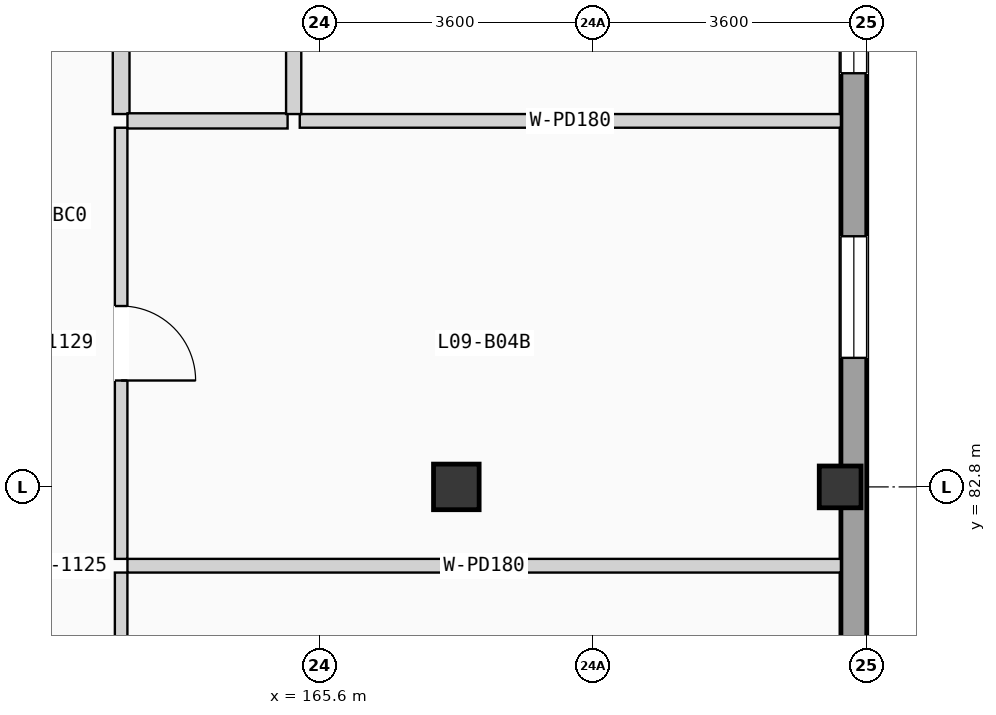
"""IFC4 building model, lengths in metres.
Left out: names, types, materials, properties, quantities, classifications, styles, units other than length and angle.
Written with IfcOpenShell. Run it as: python <this file> out.ifc"""

import sys

from ifc_helpers import new_model, si_unit, direction, frame, frame_2d, origin, origin_2d, place, context, subcontext, project, spatial, rectangle, extrude, element, fill, save


model = new_model("IFC4")
c1 = context("Model", 3, precision=1e-05, world=origin(), true_north=direction((0.0, 1.0)))
c2 = subcontext(c1, "Body", "Model", "MODEL_VIEW")
j1 = project(units=[si_unit("LENGTHUNIT", "METRE"), si_unit("PLANEANGLEUNIT", "RADIAN")], contexts=[c1])
p1 = place(None, origin())
s1 = spatial("IfcSite", under=j1, at=p1, CompositionType="ELEMENT")
p2 = place(p1, origin())
s2 = spatial("IfcBuilding", under=s1, at=p2, CompositionType="ELEMENT")
p3 = place(p2, frame((0.0, 0.0, 30.975)))
s3 = spatial("IfcBuildingStorey", under=s2, at=p3, CompositionType="ELEMENT", Elevation=30.975)
p4 = place(p3, frame((167.4, 82.8, 0.0), z_axis=(0.0, 0.0, 1.0), x_axis=(1.0, 0.0, 0.0)))
e1 = element("IfcColumn", 1, at=p4, inside=s3, PredefinedType="COLUMN", context=c2, shape_type="SweptSolid", body=[
    extrude(rectangle(XDim=0.6, YDim=0.6, at=origin_2d()), origin(), (0.0, 0.0, 1.0), 3.15),
])
p5 = place(p3, frame((172.45, 82.8, 0.0), z_axis=(0.0, 0.0, 1.0), x_axis=(1.0, 0.0, 0.0)))
e2 = element("IfcColumn", 2, at=p5, inside=s3, PredefinedType="COLUMN", context=c2, shape_type="SweptSolid", body=[
    extrude(rectangle(XDim=0.55, YDim=0.55, at=origin_2d()), origin(), (0.0, 0.0, 1.0), 3.15),
])
p6 = place(p3, frame((172.63, 68.74, 0.0), z_axis=(0.0, 0.0, 1.0), x_axis=(0.0, 1.0, 0.0)))
e3 = element("IfcWall", 3, at=p6, inside=s3, PredefinedType="SOLIDWALL", context=c2, shape_type="SweptSolid", body=[
    extrude(rectangle(XDim=49.72, YDim=0.34, at=frame_2d((24.86, 0.0))), origin(), (0.0, 0.0, 1.0), 2.9),
])
p7 = place(p6, frame((9.297, 0.0, 0.715)))
e4 = element("IfcOpeningElement", 4, at=p7, cuts=e3, PredefinedType="OPENING", context=c2, shape_type="SweptSolid", body=[
    extrude(rectangle(XDim=1.6, YDim=1.5, at=frame_2d((0.8, 0.75))), frame((0.0, 0.18, 0.0), z_axis=(0.0, -1.0, 0.0), x_axis=(1.0, 0.0, 0.0)), (0.0, 0.0, 1.0), 0.36),
])
p8 = place(p6, frame((15.758, 0.0, 0.565)))
e5 = element("IfcOpeningElement", 5, at=p8, cuts=e3, PredefinedType="OPENING", context=c2, shape_type="SweptSolid", body=[
    extrude(rectangle(XDim=1.6, YDim=1.65, at=frame_2d((0.8, 0.825))), frame((0.0, 0.18, 0.0), z_axis=(0.0, -1.0, 0.0), x_axis=(1.0, 0.0, 0.0)), (0.0, 0.0, 1.0), 0.36),
])
p9 = place(p6, frame((24.385, 0.0, 0.85)))
e6 = element("IfcOpeningElement", 6, at=p9, cuts=e3, PredefinedType="OPENING", context=c2, shape_type="SweptSolid", body=[
    extrude(rectangle(XDim=0.95, YDim=1.2, at=frame_2d((0.475, 0.6))), frame((0.0, 0.18, 0.0), z_axis=(0.0, -1.0, 0.0), x_axis=(1.0, 0.0, 0.0)), (0.0, 0.0, 1.0), 0.36),
])
p10 = place(p6, frame((19.503, 0.0, 0.85)))
e7 = element("IfcOpeningElement", 7, at=p10, cuts=e3, PredefinedType="OPENING", context=c2, shape_type="SweptSolid", body=[
    extrude(rectangle(XDim=0.95, YDim=1.2, at=frame_2d((0.475, 0.6))), frame((0.0, 0.18, 0.0), z_axis=(0.0, -1.0, 0.0), x_axis=(1.0, 0.0, 0.0)), (0.0, 0.0, 1.0), 0.36),
])
p11 = place(p6, frame((29.267, 0.0, 0.85)))
e8 = element("IfcOpeningElement", 8, at=p11, cuts=e3, PredefinedType="OPENING", context=c2, shape_type="SweptSolid", body=[
    extrude(rectangle(XDim=0.95, YDim=1.2, at=frame_2d((0.475, 0.6))), frame((0.0, 0.18, 0.0), z_axis=(0.0, -1.0, 0.0), x_axis=(1.0, 0.0, 0.0)), (0.0, 0.0, 1.0), 0.36),
])
p12 = place(p6, frame((36.508, 0.0, 0.715)))
e9 = element("IfcOpeningElement", 9, at=p12, cuts=e3, PredefinedType="OPENING", context=c2, shape_type="SweptSolid", body=[
    extrude(rectangle(XDim=1.72, YDim=1.5, at=frame_2d((0.86, 0.75))), frame((0.0, 0.18, 0.0), z_axis=(0.0, -1.0, 0.0), x_axis=(1.0, 0.0, 0.0)), (0.0, 0.0, 1.0), 0.36),
])
p13 = place(p6, frame((31.821, 0.0, 0.565)))
e10 = element("IfcOpeningElement", 10, at=p13, cuts=e3, PredefinedType="OPENING", context=c2, shape_type="SweptSolid", body=[
    extrude(rectangle(XDim=1.72, YDim=1.65, at=frame_2d((0.86, 0.825))), frame((0.0, 0.18, 0.0), z_axis=(0.0, -1.0, 0.0), x_axis=(1.0, 0.0, 0.0)), (0.0, 0.0, 1.0), 0.36),
])
p14 = place(p6, frame((40.239, 0.0, 0.85)))
e11 = element("IfcOpeningElement", 11, at=p14, cuts=e3, PredefinedType="OPENING", context=c2, shape_type="SweptSolid", body=[
    extrude(rectangle(XDim=0.95, YDim=1.2, at=frame_2d((0.475, 0.6))), frame((0.0, 0.18, 0.0), z_axis=(0.0, -1.0, 0.0), x_axis=(1.0, 0.0, 0.0)), (0.0, 0.0, 1.0), 0.36),
])
p15 = place(p3, frame((162.99, 75.945, 0.0), z_axis=(0.0, 0.0, 1.0), x_axis=(0.0, 1.0, 0.0)))
e12 = element("IfcWall", 12, at=p15, inside=s3, PredefinedType="PARTITIONING", context=c2, shape_type="SweptSolid", body=[
    extrude(rectangle(XDim=5.728, YDim=0.165, at=frame_2d((2.864, 0.0))), origin(), (0.0, 0.0, 1.0), 2.87),
])
p16 = place(p15, frame((2.402, 0.0, 0.0)))
e13 = element("IfcOpeningElement", 13, at=p16, cuts=e12, PredefinedType="OPENING", context=c2, shape_type="SweptSolid", body=[
    extrude(rectangle(XDim=0.98, YDim=2.08, at=frame_2d((0.49, 1.04))), frame((0.0, 0.093, 0.0), z_axis=(0.0, -1.0, 0.0), x_axis=(1.0, 0.0, 0.0)), (0.0, 0.0, 1.0), 0.185),
])
p17 = place(p3, frame((162.99, 81.853, 0.0), z_axis=(0.0, 0.0, 1.0), x_axis=(0.0, 1.0, 0.0)))
e14 = element("IfcWall", 14, at=p17, inside=s3, PredefinedType="PARTITIONING", context=c2, shape_type="SweptSolid", body=[
    extrude(rectangle(XDim=5.673, YDim=0.165, at=frame_2d((2.836, 0.0))), origin(), (0.0, 0.0, 1.0), 2.87),
])
p18 = place(p17, frame((2.347, 0.0, 0.0)))
e15 = element("IfcOpeningElement", 15, at=p18, cuts=e14, PredefinedType="OPENING", context=c2, shape_type="SweptSolid", body=[
    extrude(rectangle(XDim=0.98, YDim=2.08, at=frame_2d((0.49, 1.04))), frame((0.0, 0.093, 0.0), z_axis=(0.0, -1.0, 0.0), x_axis=(1.0, 0.0, 0.0)), (0.0, 0.0, 1.0), 0.185),
])
p19 = place(p3, frame((162.99, 87.706, 0.0), z_axis=(0.0, 0.0, 1.0), x_axis=(0.0, 1.0, 0.0)))
e16 = element("IfcWall", 16, at=p19, inside=s3, PredefinedType="PLUMBINGWALL", context=c2, shape_type="SweptSolid", body=[
    extrude(rectangle(XDim=3.574, YDim=0.22, at=frame_2d((1.787, 0.0))), origin(), (0.0, 0.0, 1.0), 2.87),
])
p20 = place(p3, frame((163.073, 81.763, 0.0), z_axis=(0.0, 0.0, 1.0), x_axis=(1.0, 0.0, 0.0)))
e17 = element("IfcWall", 17, at=p20, inside=s3, PredefinedType="PARTITIONING", context=c2, shape_type="SweptSolid", body=[
    extrude(rectangle(XDim=9.387, YDim=0.18, at=frame_2d((4.693, 0.0))), origin(), (0.0, 0.0, 1.0), 2.87),
])
p21 = place(p3, frame((163.073, 87.616, 0.0), z_axis=(0.0, 0.0, 1.0), x_axis=(1.0, 0.0, 0.0)))
e18 = element("IfcWall", 18, at=p21, inside=s3, PredefinedType="PLUMBINGWALL", context=c2, shape_type="SweptSolid", body=[
    extrude(rectangle(XDim=2.107, YDim=0.2, at=frame_2d((1.053, 0.0))), origin(), (0.0, 0.0, 1.0), 2.87),
])
p22 = place(p3, frame((165.34, 87.616, 0.0), z_axis=(0.0, 0.0, 1.0), x_axis=(1.0, 0.0, 0.0)))
e19 = element("IfcWall", 19, at=p22, inside=s3, PredefinedType="PARTITIONING", context=c2, shape_type="SweptSolid", body=[
    extrude(rectangle(XDim=7.12, YDim=0.18, at=frame_2d((3.56, 0.0))), origin(), (0.0, 0.0, 1.0), 2.87),
])
p23 = place(p3, frame((165.26, 87.706, 0.0), z_axis=(0.0, 0.0, 1.0), x_axis=(0.0, 1.0, 0.0)))
e20 = element("IfcWall", 20, at=p23, inside=s3, PredefinedType="PLUMBINGWALL", context=c2, shape_type="SweptSolid", body=[
    extrude(rectangle(XDim=3.574, YDim=0.2, at=frame_2d((1.787, 0.0))), origin(), (0.0, 0.0, 1.0), 2.87),
])
p24 = place(p8, origin())
e21 = element("IfcWindow", 21, at=p24, inside=s3, PartitioningType="DOUBLE_PANEL_VERTICAL", PredefinedType="WINDOW", context=c2, shape_type="SweptSolid", body=[
    extrude(rectangle(XDim=1.6, YDim=1.65, at=frame_2d((0.8, 0.825))), frame((0.0, 0.03, 0.0), z_axis=(0.0, -1.0, 0.0), x_axis=(1.0, 0.0, 0.0)), (0.0, 0.0, 1.0), 0.06),
])
fill(e5, e21)
p25 = place(p10, origin())
e22 = element("IfcWindow", 22, at=p25, inside=s3, PartitioningType="SINGLE_PANEL", PredefinedType="WINDOW", context=c2, shape_type="SweptSolid", body=[
    extrude(rectangle(XDim=0.95, YDim=1.2, at=frame_2d((0.475, 0.6))), frame((0.0, 0.03, 0.0), z_axis=(0.0, -1.0, 0.0), x_axis=(1.0, 0.0, 0.0)), (0.0, 0.0, 1.0), 0.06),
])
fill(e7, e22)
p26 = place(p18, frame((0.98, 0.0, 0.0), z_axis=(0.0, 0.0, 1.0), x_axis=(-1.0, 0.0, 0.0)))
e23 = element("IfcDoor", 23, at=p26, inside=s3, OperationType="SINGLE_SWING_LEFT", PredefinedType="DOOR", context=c2, shape_type="SweptSolid", body=[
    extrude(rectangle(XDim=0.98, YDim=2.08, at=frame_2d((0.49, 1.04))), frame((0.0, 0.025, 0.0), z_axis=(0.0, -1.0, 0.0), x_axis=(1.0, 0.0, 0.0)), (0.0, 0.0, 1.0), 0.05),
])
fill(e15, e23)
save(model, sys.argv[1])
